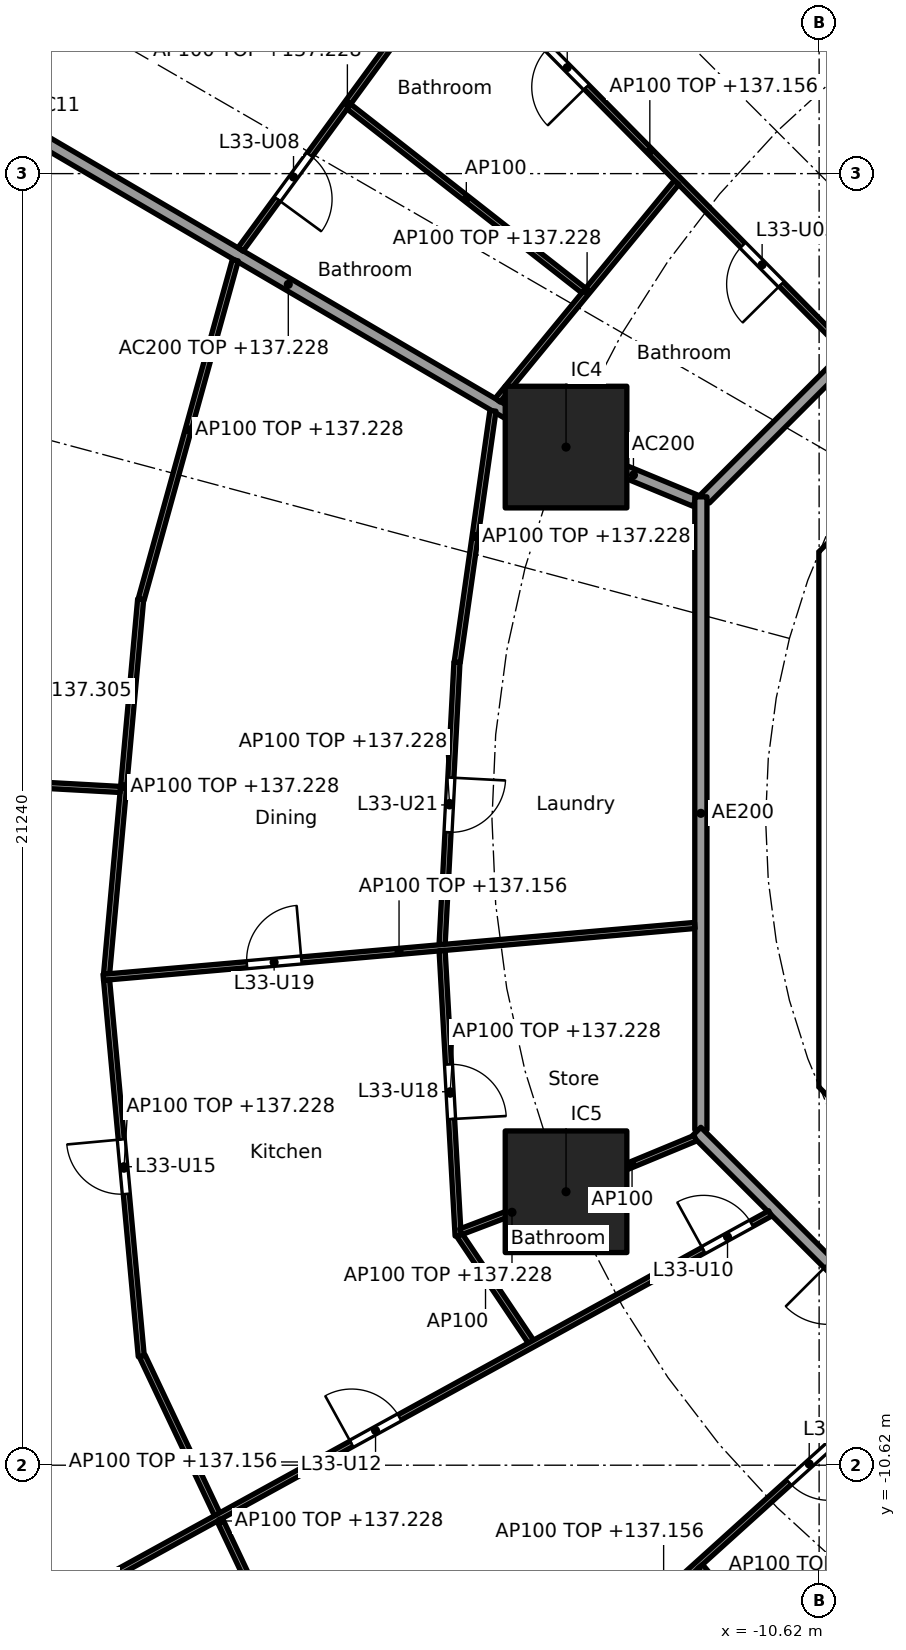
"""IFC4 building model, lengths in metres.
Left out: names, types, materials, properties, quantities, classifications, styles, units other than length and angle.
Written with IfcOpenShell. Run it as: python <this file> out.ifc"""

import sys

from ifc_helpers import new_model, si_unit, direction, frame, frame_2d, origin, origin_2d, place, context, subcontext, project, spatial, polyline, rectangle, outline, extrude, element, fill, save


model = new_model("IFC4")
c1 = context("Model", 3, precision=1e-05, world=origin(), true_north=direction((0.0, 1.0)))
c2 = subcontext(c1, "Body", "Model", "MODEL_VIEW")
j1 = project(units=[si_unit("LENGTHUNIT", "METRE"), si_unit("PLANEANGLEUNIT", "RADIAN")], contexts=[c1])
p1 = place(None, origin())
s1 = spatial("IfcSite", under=j1, at=p1, CompositionType="ELEMENT")
p2 = place(p1, origin())
s2 = spatial("IfcBuilding", under=s1, at=p2, CompositionType="ELEMENT")
p3 = place(p2, frame((0.0, 0.0, 134.4)))
s3 = spatial("IfcBuildingStorey", under=s2, at=p3, CompositionType="ELEMENT", Elevation=134.4)
for number, where, z_axis, x_axis in (
    (1, (-14.782, 6.123, 0.0), (0.0, 0.0, 1.0), (1.0, 0.0, 0.0)),
    (2, (-14.782, -6.123, 0.0), (0.0, 0.0, 1.0), (1.0, 0.0, 0.0)),
):
    element("IfcColumn", number, at=place(p3, frame(where, z_axis=z_axis, x_axis=x_axis)), inside=s3, PredefinedType="COLUMN", context=c2, shape_type="SweptSolid", body=[
        extrude(rectangle(XDim=2.0, YDim=2.0, at=origin_2d()), origin(), (0.0, 0.0, 1.0), 3.7),
    ])
p4 = place(p3, frame((-10.325, 3.801, 0.0), z_axis=(0.0, 0.0, 1.0), x_axis=(0.0, -1.0, 0.0)))
e3 = element("IfcWall", 3, at=p4, inside=s3, PredefinedType="SHEAR", context=c2, shape_type="SweptSolid", body=[
    extrude(rectangle(XDim=7.602, YDim=0.6, at=frame_2d((3.801, 0.0))), origin(), (0.0, 0.0, 1.0), 3.44),
])
p5 = place(p4, frame((0.651, 0.0, 0.0)))
e4 = element("IfcOpeningElement", 4, at=p5, cuts=e3, PredefinedType="OPENING", context=c2, shape_type="SweptSolid", body=[
    extrude(rectangle(XDim=1.5, YDim=2.1, at=frame_2d((0.75, 1.05))), frame((0.0, 0.31, 0.0), z_axis=(0.0, -1.0, 0.0), x_axis=(1.0, 0.0, 0.0)), (0.0, 0.0, 1.0), 0.62),
])
p6 = place(p4, frame((5.451, 0.0, 0.0)))
e5 = element("IfcOpeningElement", 5, at=p6, cuts=e3, PredefinedType="OPENING", context=c2, shape_type="SweptSolid", body=[
    extrude(rectangle(XDim=1.5, YDim=2.1, at=frame_2d((0.75, 1.05))), frame((0.0, 0.31, 0.0), z_axis=(0.0, -1.0, 0.0), x_axis=(1.0, 0.0, 0.0)), (0.0, 0.0, 1.0), 0.62),
])
p7 = place(p3, origin())
e6 = element("IfcWall", 6, at=p7, inside=s3, PredefinedType="SHEAR", context=c2, shape_type="SweptSolid", body=[
    extrude(outline(polyline([(-10.625, -3.801), (-10.025, -3.801), (-10.025, -4.152), (-9.776, -4.401), (-10.2, -4.825), (-10.625, -4.401), (-10.625, -3.801)])), origin(), (0.0, 0.0, 1.0), 3.44),
])
p8 = place(p3, origin())
e7 = element("IfcWall", 7, at=p8, inside=s3, PredefinedType="SHEAR", context=c2, shape_type="SweptSolid", body=[
    extrude(outline(polyline([(-10.2, 4.825), (-9.776, 4.401), (-10.025, 4.152), (-10.025, 3.801), (-10.625, 3.801), (-10.625, 4.401), (-10.2, 4.825)])), origin(), (0.0, 0.0, 1.0), 3.44),
])
p9 = place(p3, frame((-12.657, 5.243, 0.0), z_axis=(0.0, 0.0, 1.0), x_axis=(-0.923869415315, 0.382707856524, 0.0)))
e8 = element("IfcWall", 8, at=p9, inside=s3, PredefinedType="PARTITIONING", context=c2, shape_type="SweptSolid", body=[
    extrude(rectangle(XDim=2.2, YDim=0.2, at=frame_2d((1.1, 0.0))), origin(), (0.0, 0.0, 1.0), 3.44),
])
p10 = place(p3, frame((-14.825, 6.148, 0.0), z_axis=(0.0, 0.0, 1.0), x_axis=(-0.862852031662, 0.505456597006, 0.0)))
e9 = element("IfcWall", 9, at=p10, inside=s3, PredefinedType="PARTITIONING", context=c2, shape_type="SweptSolid", body=[
    extrude(rectangle(XDim=10.487, YDim=0.2, at=frame_2d((5.244, 0.0))), origin(), (0.0, 0.0, 1.0), 2.828),
])
p11 = place(p3, frame((-5.275, 12.494, 0.0), z_axis=(0.0, 0.0, 1.0), x_axis=(-0.707106781187, -0.707106781187, 0.0)))
e10 = element("IfcWall", 10, at=p11, inside=s3, PredefinedType="PARTITIONING", context=c2, shape_type="SweptSolid", body=[
    extrude(rectangle(XDim=10.209, YDim=0.2, at=frame_2d((5.104, 0.0))), origin(), (0.0, 0.0, 1.0), 3.44),
])
p12 = place(p11, frame((4.604, 0.0, 0.0)))
e11 = element("IfcOpeningElement", 11, at=p12, cuts=e10, PredefinedType="OPENING", context=c2, shape_type="SweptSolid", body=[
    extrude(rectangle(XDim=1.0, YDim=2.1, at=frame_2d((0.5, 1.05))), frame((0.0, 0.11, 0.0), z_axis=(0.0, -1.0, 0.0), x_axis=(1.0, 0.0, 0.0)), (0.0, 0.0, 1.0), 0.22),
])
p13 = place(p3, frame((-12.565, 5.304, 0.0), z_axis=(0.0, 0.0, 1.0), x_axis=(0.0, -1.0, 0.0)))
e12 = element("IfcWall", 12, at=p13, inside=s3, PredefinedType="PARTITIONING", context=c2, shape_type="SweptSolid", body=[
    extrude(rectangle(XDim=10.409, YDim=0.2, at=frame_2d((5.205, 0.0))), origin(), (0.0, 0.0, 1.0), 3.44),
])
p14 = place(p3, frame((-12.635, -5.134, 0.0), z_axis=(0.0, 0.0, 1.0), x_axis=(0.707106781187, -0.707106781187, 0.0)))
e13 = element("IfcWall", 13, at=p14, inside=s3, PredefinedType="PARTITIONING", context=c2, shape_type="SweptSolid", body=[
    extrude(rectangle(XDim=10.609, YDim=0.2, at=frame_2d((5.305, 0.0))), origin(), (0.0, 0.0, 1.0), 3.44),
])
p15 = place(p14, frame((3.07, 0.0, 0.0)))
e14 = element("IfcOpeningElement", 14, at=p15, cuts=e13, PredefinedType="OPENING", context=c2, shape_type="SweptSolid", body=[
    extrude(rectangle(XDim=1.0, YDim=2.1, at=frame_2d((0.5, 1.05))), frame((0.0, 0.11, 0.0), z_axis=(0.0, -1.0, 0.0), x_axis=(1.0, 0.0, 0.0)), (0.0, 0.0, 1.0), 0.22),
])
p16 = place(p3, frame((-7.708, 10.198, 0.0), z_axis=(0.0, 0.0, 1.0), x_axis=(-0.497449462689, 0.867492957937, 0.0)))
e15 = element("IfcWall", 15, at=p16, inside=s3, PredefinedType="PARTITIONING", context=c2, shape_type="SweptSolid", body=[
    extrude(rectangle(XDim=9.185, YDim=0.1, at=frame_2d((4.592, 0.0))), origin(), (0.0, 0.0, 1.0), 2.756),
])
p17 = place(p16, frame((1.511, 0.0, 0.0)))
e16 = element("IfcOpeningElement", 16, at=p17, cuts=e15, PredefinedType="OPENING", context=c2, shape_type="SweptSolid", body=[
    extrude(rectangle(XDim=0.9, YDim=2.1, at=frame_2d((0.45, 1.05))), frame((0.0, 0.06, 0.0), z_axis=(0.0, -1.0, 0.0), x_axis=(1.0, 0.0, 0.0)), (0.0, 0.0, 1.0), 0.12),
])
p18 = place(p16, frame((6.078, 0.0, 0.0)))
e17 = element("IfcOpeningElement", 17, at=p18, cuts=e15, PredefinedType="OPENING", context=c2, shape_type="SweptSolid", body=[
    extrude(rectangle(XDim=0.9, YDim=2.1, at=frame_2d((0.45, 1.05))), frame((0.0, 0.06, 0.0), z_axis=(0.0, -1.0, 0.0), x_axis=(1.0, 0.0, 0.0)), (0.0, 0.0, 1.0), 0.12),
])
p19 = place(p3, frame((-10.182, 7.729, 0.0), z_axis=(0.0, 0.0, 1.0), x_axis=(-0.702927211734, 0.711261790766, 0.0)))
e18 = element("IfcWall", 18, at=p19, inside=s3, PredefinedType="PARTITIONING", context=c2, shape_type="SweptSolid", body=[
    extrude(rectangle(XDim=9.168, YDim=0.1, at=frame_2d((4.584, 0.0))), origin(), (0.0, 0.0, 1.0), 2.756),
])
p20 = place(p19, frame((1.507, 0.0, 0.0)))
e19 = element("IfcOpeningElement", 19, at=p20, cuts=e18, PredefinedType="OPENING", context=c2, shape_type="SweptSolid", body=[
    extrude(rectangle(XDim=0.9, YDim=2.1, at=frame_2d((0.45, 1.05))), frame((0.0, 0.06, 0.0), z_axis=(0.0, -1.0, 0.0), x_axis=(1.0, 0.0, 0.0)), (0.0, 0.0, 1.0), 0.12),
])
p21 = place(p19, frame((6.067, 0.0, 0.0)))
e20 = element("IfcOpeningElement", 20, at=p21, cuts=e18, PredefinedType="OPENING", context=c2, shape_type="SweptSolid", body=[
    extrude(rectangle(XDim=0.9, YDim=2.1, at=frame_2d((0.45, 1.05))), frame((0.0, 0.06, 0.0), z_axis=(0.0, -1.0, 0.0), x_axis=(1.0, 0.0, 0.0)), (0.0, 0.0, 1.0), 0.12),
])
p22 = place(p3, frame((-12.965, 10.475, 0.0), z_axis=(0.0, 0.0, 1.0), x_axis=(-0.634943961338, -0.772558195841, 0.0)))
e21 = element("IfcWall", 21, at=p22, inside=s3, PredefinedType="PARTITIONING", context=c2, shape_type="SweptSolid", body=[
    extrude(rectangle(XDim=4.632, YDim=0.1, at=frame_2d((2.316, 0.0))), origin(), (0.0, 0.0, 1.0), 2.828),
])
p23 = place(p3, frame((-16.621, 14.174, 0.0), z_axis=(0.0, 0.0, 1.0), x_axis=(-0.590674917338, -0.806909624449, 0.0)))
e22 = element("IfcWall", 22, at=p23, inside=s3, PredefinedType="PARTITIONING", context=c2, shape_type="SweptSolid", body=[
    extrude(rectangle(XDim=5.949, YDim=0.1, at=frame_2d((2.975, 0.0))), origin(), (0.0, 0.0, 1.0), 2.828),
])
p24 = place(p23, frame((4.024, 0.0, 0.0)))
e23 = element("IfcOpeningElement", 23, at=p24, cuts=e22, PredefinedType="OPENING", context=c2, shape_type="SweptSolid", body=[
    extrude(rectangle(XDim=0.9, YDim=2.1, at=frame_2d((0.45, 1.05))), frame((0.0, 0.06, 0.0), z_axis=(0.0, -1.0, 0.0), x_axis=(1.0, 0.0, 0.0)), (0.0, 0.0, 1.0), 0.12),
])
p25 = place(p3, frame((-14.491, 8.697, 0.0), z_axis=(0.0, 0.0, 1.0), x_axis=(-0.787139479951, 0.616775031193, 0.0)))
e24 = element("IfcWall", 24, at=p25, inside=s3, PredefinedType="PARTITIONING", context=c2, shape_type="SweptSolid", body=[
    extrude(rectangle(XDim=4.907, YDim=0.1, at=frame_2d((2.453, 0.0))), origin(), (0.0, 0.0, 1.0), 3.44),
])
p26 = place(p3, frame((-15.984, 6.72, 0.0), z_axis=(0.0, 0.0, 1.0), x_axis=(-0.140684869512, -0.990054426529, 0.0)))
e25 = element("IfcWall", 25, at=p26, inside=s3, PredefinedType="PARTITIONING", context=c2, shape_type="SweptSolid", body=[
    extrude(rectangle(XDim=4.177, YDim=0.1, at=frame_2d((2.088, 0.0))), origin(), (0.0, 0.0, 1.0), 2.828),
])
p27 = place(p3, frame((-20.221, 9.197, 0.0), z_axis=(0.0, 0.0, 1.0), x_axis=(-0.267398009191, -0.963586168789, 0.0)))
e26 = element("IfcWall", 26, at=p27, inside=s3, PredefinedType="PARTITIONING", context=c2, shape_type="SweptSolid", body=[
    extrude(rectangle(XDim=5.788, YDim=0.1, at=frame_2d((2.894, 0.0))), origin(), (0.0, 0.0, 1.0), 2.828),
])
p28 = place(p3, frame((-16.576, 2.585, 0.0), z_axis=(0.0, 0.0, 1.0), x_axis=(-0.052509224895, -0.998620439056, 0.0)))
e27 = element("IfcWall", 27, at=p28, inside=s3, PredefinedType="PARTITIONING", context=c2, shape_type="SweptSolid", body=[
    extrude(rectangle(XDim=4.649, YDim=0.1, at=frame_2d((2.325, 0.0))), origin(), (0.0, 0.0, 1.0), 2.828),
])
p29 = place(p28, frame((1.9, 0.0, 0.0)))
e28 = element("IfcOpeningElement", 28, at=p29, cuts=e27, PredefinedType="OPENING", context=c2, shape_type="SweptSolid", body=[
    extrude(rectangle(XDim=0.9, YDim=2.1, at=frame_2d((0.45, 1.05))), frame((0.0, 0.06, 0.0), z_axis=(0.0, -1.0, 0.0), x_axis=(1.0, 0.0, 0.0)), (0.0, 0.0, 1.0), 0.12),
])
p30 = place(p3, frame((-21.777, 3.621, 0.0), z_axis=(0.0, 0.0, 1.0), x_axis=(-0.090606877484, -0.995886737412, 0.0)))
e29 = element("IfcWall", 29, at=p30, inside=s3, PredefinedType="PARTITIONING", context=c2, shape_type="SweptSolid", body=[
    extrude(rectangle(XDim=6.189, YDim=0.1, at=frame_2d((3.095, 0.0))), origin(), (0.0, 0.0, 1.0), 2.828),
])
p31 = place(p3, frame((-22.112, 0.492, 0.0), z_axis=(0.0, 0.0, 1.0), x_axis=(-0.998479185151, 0.055129999278, 0.0)))
e30 = element("IfcWall", 30, at=p31, inside=s3, PredefinedType="PARTITIONING", context=c2, shape_type="SweptSolid", body=[
    extrude(rectangle(XDim=5.965, YDim=0.1, at=frame_2d((2.982, 0.0))), origin(), (0.0, 0.0, 1.0), 2.905),
])
p32 = place(p31, frame((2.533, 0.0, 0.0)))
e31 = element("IfcOpeningElement", 31, at=p32, cuts=e30, PredefinedType="OPENING", context=c2, shape_type="SweptSolid", body=[
    extrude(rectangle(XDim=0.9, YDim=2.1, at=frame_2d((0.45, 1.05))), frame((0.0, 0.06, 0.0), z_axis=(0.0, -1.0, 0.0), x_axis=(1.0, 0.0, 0.0)), (0.0, 0.0, 1.0), 0.12),
])
p33 = place(p3, frame((-12.664, -1.744, 0.0), z_axis=(0.0, 0.0, 1.0), x_axis=(-0.99617728169, -0.087354584571, 0.0)))
e32 = element("IfcWall", 32, at=p33, inside=s3, PredefinedType="PARTITIONING", context=c2, shape_type="SweptSolid", body=[
    extrude(rectangle(XDim=9.765, YDim=0.1, at=frame_2d((4.883, 0.0))), origin(), (0.0, 0.0, 1.0), 2.756),
])
p34 = place(p33, frame((6.495, 0.0, 0.0)))
e33 = element("IfcOpeningElement", 33, at=p34, cuts=e32, PredefinedType="OPENING", context=c2, shape_type="SweptSolid", body=[
    extrude(rectangle(XDim=0.9, YDim=2.1, at=frame_2d((0.45, 1.05))), frame((0.0, 0.06, 0.0), z_axis=(0.0, -1.0, 0.0), x_axis=(1.0, 0.0, 0.0)), (0.0, 0.0, 1.0), 0.12),
])
p35 = place(p3, frame((-16.82, -2.158, 0.0), z_axis=(0.0, 0.0, 1.0), x_axis=(0.055967931845, -0.998432566879, 0.0)))
e34 = element("IfcWall", 34, at=p35, inside=s3, PredefinedType="PARTITIONING", context=c2, shape_type="SweptSolid", body=[
    extrude(rectangle(XDim=4.698, YDim=0.1, at=frame_2d((2.349, 0.0))), origin(), (0.0, 0.0, 1.0), 2.828),
])
p36 = place(p35, frame((1.874, 0.0, 0.0)))
e35 = element("IfcOpeningElement", 35, at=p36, cuts=e34, PredefinedType="OPENING", context=c2, shape_type="SweptSolid", body=[
    extrude(rectangle(XDim=0.9, YDim=2.1, at=frame_2d((0.45, 1.05))), frame((0.0, 0.06, 0.0), z_axis=(0.0, -1.0, 0.0), x_axis=(1.0, 0.0, 0.0)), (0.0, 0.0, 1.0), 0.12),
])
p37 = place(p3, frame((-22.338, -2.642, 0.0), z_axis=(0.0, 0.0, 1.0), x_axis=(0.091768304523, -0.995780386574, 0.0)))
e36 = element("IfcWall", 36, at=p37, inside=s3, PredefinedType="PARTITIONING", context=c2, shape_type="SweptSolid", body=[
    extrude(rectangle(XDim=6.215, YDim=0.1, at=frame_2d((3.107, 0.0))), origin(), (0.0, 0.0, 1.0), 2.828),
])
p38 = place(p37, frame((2.632, 0.0, 0.0)))
e37 = element("IfcOpeningElement", 37, at=p38, cuts=e36, PredefinedType="OPENING", context=c2, shape_type="SweptSolid", body=[
    extrude(rectangle(XDim=0.9, YDim=2.1, at=frame_2d((0.45, 1.05))), frame((0.0, 0.06, 0.0), z_axis=(0.0, -1.0, 0.0), x_axis=(1.0, 0.0, 0.0)), (0.0, 0.0, 1.0), 0.12),
])
p39 = place(p3, frame((-12.657, -5.243, 0.0), z_axis=(0.0, 0.0, 1.0), x_axis=(-0.923864733477, -0.382719158442, 0.0)))
e38 = element("IfcWall", 38, at=p39, inside=s3, PredefinedType="PARTITIONING", context=c2, shape_type="SweptSolid", body=[
    extrude(rectangle(XDim=2.25, YDim=0.1, at=frame_2d((1.125, 0.0))), origin(), (0.0, 0.0, 1.0), 3.44),
])
p40 = place(p3, frame((-14.829, -6.141, 0.0), z_axis=(0.0, 0.0, 1.0), x_axis=(-0.934704367514, -0.355426146128, 0.0)))
e39 = element("IfcWall", 39, at=p40, inside=s3, PredefinedType="PARTITIONING", context=c2, shape_type="SweptSolid", body=[
    extrude(rectangle(XDim=1.802, YDim=0.1, at=frame_2d((0.901, 0.0))), origin(), (0.0, 0.0, 1.0), 2.828),
])
p41 = place(p3, frame((-16.532, -6.84, 0.0), z_axis=(0.0, 0.0, 1.0), x_axis=(0.556994773624, -0.830515997531, 0.0)))
e40 = element("IfcWall", 40, at=p41, inside=s3, PredefinedType="PARTITIONING", context=c2, shape_type="SweptSolid", body=[
    extrude(rectangle(XDim=2.183, YDim=0.1, at=frame_2d((1.092, 0.0))), origin(), (0.0, 0.0, 1.0), 3.44),
])
p42 = place(p3, frame((-21.75, -8.826, 0.0), z_axis=(0.0, 0.0, 1.0), x_axis=(0.427736419988, -0.903903509793, 0.0)))
e41 = element("IfcWall", 41, at=p42, inside=s3, PredefinedType="PARTITIONING", context=c2, shape_type="SweptSolid", body=[
    extrude(rectangle(XDim=5.999, YDim=0.1, at=frame_2d((3.0, 0.0))), origin(), (0.0, 0.0, 1.0), 2.828),
])
p43 = place(p3, frame((-11.426, -6.479, 0.0), z_axis=(0.0, 0.0, 1.0), x_axis=(-0.876110392495, -0.482110547657, 0.0)))
e42 = element("IfcWall", 42, at=p43, inside=s3, PredefinedType="PARTITIONING", context=c2, shape_type="SweptSolid", body=[
    extrude(rectangle(XDim=16.955, YDim=0.1, at=frame_2d((8.478, 0.0))), origin(), (0.0, 0.0, 1.0), 2.756),
])
p44 = place(p43, frame((0.35, 0.0, 0.0)))
e43 = element("IfcOpeningElement", 43, at=p44, cuts=e42, PredefinedType="OPENING", context=c2, shape_type="SweptSolid", body=[
    extrude(rectangle(XDim=0.9, YDim=2.1, at=frame_2d((0.45, 1.05))), frame((0.0, 0.06, 0.0), z_axis=(0.0, -1.0, 0.0), x_axis=(1.0, 0.0, 0.0)), (0.0, 0.0, 1.0), 0.12),
])
p45 = place(p43, frame((6.957, 0.0, 0.0)))
e44 = element("IfcOpeningElement", 44, at=p45, cuts=e42, PredefinedType="OPENING", context=c2, shape_type="SweptSolid", body=[
    extrude(rectangle(XDim=0.9, YDim=2.1, at=frame_2d((0.45, 1.05))), frame((0.0, 0.06, 0.0), z_axis=(0.0, -1.0, 0.0), x_axis=(1.0, 0.0, 0.0)), (0.0, 0.0, 1.0), 0.12),
])
p46 = place(p43, frame((13.206, 0.0, 0.0)))
e45 = element("IfcOpeningElement", 45, at=p46, cuts=e42, PredefinedType="OPENING", context=c2, shape_type="SweptSolid", body=[
    extrude(rectangle(XDim=0.9, YDim=2.1, at=frame_2d((0.45, 1.05))), frame((0.0, 0.06, 0.0), z_axis=(0.0, -1.0, 0.0), x_axis=(1.0, 0.0, 0.0)), (0.0, 0.0, 1.0), 0.12),
])
p47 = place(p3, frame((-8.959, -8.952, 0.0), z_axis=(0.0, 0.0, 1.0), x_axis=(-0.741982736283, -0.670418987692, 0.0)))
e46 = element("IfcWall", 46, at=p47, inside=s3, PredefinedType="PARTITIONING", context=c2, shape_type="SweptSolid", body=[
    extrude(rectangle(XDim=11.371, YDim=0.1, at=frame_2d((5.685, 0.0))), origin(), (0.0, 0.0, 1.0), 2.756),
])
p48 = place(p47, frame((2.009, 0.0, 0.0)))
e47 = element("IfcOpeningElement", 47, at=p48, cuts=e46, PredefinedType="OPENING", context=c2, shape_type="SweptSolid", body=[
    extrude(rectangle(XDim=0.9, YDim=2.1, at=frame_2d((0.45, 1.05))), frame((0.0, 0.06, 0.0), z_axis=(0.0, -1.0, 0.0), x_axis=(1.0, 0.0, 0.0)), (0.0, 0.0, 1.0), 0.12),
])
p49 = place(p47, frame((7.694, 0.0, 0.0)))
e48 = element("IfcOpeningElement", 48, at=p49, cuts=e46, PredefinedType="OPENING", context=c2, shape_type="SweptSolid", body=[
    extrude(rectangle(XDim=0.9, YDim=2.1, at=frame_2d((0.45, 1.05))), frame((0.0, 0.06, 0.0), z_axis=(0.0, -1.0, 0.0), x_axis=(1.0, 0.0, 0.0)), (0.0, 0.0, 1.0), 0.12),
])
p50 = place(p3, frame((-12.575, -12.286, 0.0), z_axis=(0.0, 0.0, 1.0), x_axis=(0.644052758448, -0.764981074495, 0.0)))
e49 = element("IfcWall", 49, at=p50, inside=s3, PredefinedType="PARTITIONING", context=c2, shape_type="SweptSolid", body=[
    extrude(rectangle(XDim=2.174, YDim=0.1, at=frame_2d((1.087, 0.0))), origin(), (0.0, 0.0, 1.0), 2.828),
])
p51 = place(p20, origin())
e50 = element("IfcDoor", 50, at=p51, inside=s3, OperationType="SINGLE_SWING_LEFT", PredefinedType="DOOR", context=c2, shape_type="SweptSolid", body=[
    extrude(rectangle(XDim=0.9, YDim=2.1, at=frame_2d((0.45, 1.05))), frame((0.0, 0.025, 0.0), z_axis=(0.0, -1.0, 0.0), x_axis=(1.0, 0.0, 0.0)), (0.0, 0.0, 1.0), 0.05),
])
fill(e19, e50)
p52 = place(p21, origin())
e51 = element("IfcDoor", 51, at=p52, inside=s3, OperationType="SINGLE_SWING_LEFT", PredefinedType="DOOR", context=c2, shape_type="SweptSolid", body=[
    extrude(rectangle(XDim=0.9, YDim=2.1, at=frame_2d((0.45, 1.05))), frame((0.0, 0.025, 0.0), z_axis=(0.0, -1.0, 0.0), x_axis=(1.0, 0.0, 0.0)), (0.0, 0.0, 1.0), 0.05),
])
fill(e20, e51)
p53 = place(p24, origin())
e52 = element("IfcDoor", 52, at=p53, inside=s3, OperationType="SINGLE_SWING_RIGHT", PredefinedType="DOOR", context=c2, shape_type="SweptSolid", body=[
    extrude(rectangle(XDim=0.9, YDim=2.1, at=frame_2d((0.45, 1.05))), frame((0.0, 0.025, 0.0), z_axis=(0.0, -1.0, 0.0), x_axis=(1.0, 0.0, 0.0)), (0.0, 0.0, 1.0), 0.05),
])
fill(e23, e52)
p54 = place(p44, frame((0.9, 0.0, 0.0), x_axis=(-1.0, 0.0, 0.0)))
e53 = element("IfcDoor", 53, at=p54, inside=s3, OperationType="SINGLE_SWING_LEFT", PredefinedType="DOOR", context=c2, shape_type="SweptSolid", body=[
    extrude(rectangle(XDim=0.9, YDim=2.1, at=frame_2d((0.45, 1.05))), frame((0.0, 0.025, 0.0), z_axis=(0.0, -1.0, 0.0), x_axis=(1.0, 0.0, 0.0)), (0.0, 0.0, 1.0), 0.05),
])
fill(e43, e53)
p55 = place(p48, origin())
e54 = element("IfcDoor", 54, at=p55, inside=s3, OperationType="SINGLE_SWING_LEFT", PredefinedType="DOOR", context=c2, shape_type="SweptSolid", body=[
    extrude(rectangle(XDim=0.9, YDim=2.1, at=frame_2d((0.45, 1.05))), frame((0.0, 0.025, 0.0), z_axis=(0.0, -1.0, 0.0), x_axis=(1.0, 0.0, 0.0)), (0.0, 0.0, 1.0), 0.05),
])
fill(e47, e54)
p56 = place(p45, frame((0.9, 0.0, 0.0), x_axis=(-1.0, 0.0, 0.0)))
e55 = element("IfcDoor", 55, at=p56, inside=s3, OperationType="SINGLE_SWING_LEFT", PredefinedType="DOOR", context=c2, shape_type="SweptSolid", body=[
    extrude(rectangle(XDim=0.9, YDim=2.1, at=frame_2d((0.45, 1.05))), frame((0.0, 0.025, 0.0), z_axis=(0.0, -1.0, 0.0), x_axis=(1.0, 0.0, 0.0)), (0.0, 0.0, 1.0), 0.05),
])
fill(e44, e55)
p57 = place(p38, frame((0.9, 0.0, 0.0), x_axis=(-1.0, 0.0, 0.0)))
e56 = element("IfcDoor", 56, at=p57, inside=s3, OperationType="SINGLE_SWING_RIGHT", PredefinedType="DOOR", context=c2, shape_type="SweptSolid", body=[
    extrude(rectangle(XDim=0.9, YDim=2.1, at=frame_2d((0.45, 1.05))), frame((0.0, 0.025, 0.0), z_axis=(0.0, -1.0, 0.0), x_axis=(1.0, 0.0, 0.0)), (0.0, 0.0, 1.0), 0.05),
])
fill(e37, e56)
p58 = place(p36, origin())
e57 = element("IfcDoor", 57, at=p58, inside=s3, OperationType="SINGLE_SWING_RIGHT", PredefinedType="DOOR", context=c2, shape_type="SweptSolid", body=[
    extrude(rectangle(XDim=0.9, YDim=2.1, at=frame_2d((0.45, 1.05))), frame((0.0, 0.025, 0.0), z_axis=(0.0, -1.0, 0.0), x_axis=(1.0, 0.0, 0.0)), (0.0, 0.0, 1.0), 0.05),
])
fill(e35, e57)
p59 = place(p34, frame((0.9, 0.0, 0.0), x_axis=(-1.0, 0.0, 0.0)))
e58 = element("IfcDoor", 58, at=p59, inside=s3, OperationType="SINGLE_SWING_RIGHT", PredefinedType="DOOR", context=c2, shape_type="SweptSolid", body=[
    extrude(rectangle(XDim=0.9, YDim=2.1, at=frame_2d((0.45, 1.05))), frame((0.0, 0.025, 0.0), z_axis=(0.0, -1.0, 0.0), x_axis=(1.0, 0.0, 0.0)), (0.0, 0.0, 1.0), 0.05),
])
fill(e33, e58)
p60 = place(p29, origin())
e59 = element("IfcDoor", 59, at=p60, inside=s3, OperationType="SINGLE_SWING_LEFT", PredefinedType="DOOR", context=c2, shape_type="SweptSolid", body=[
    extrude(rectangle(XDim=0.9, YDim=2.1, at=frame_2d((0.45, 1.05))), frame((0.0, 0.025, 0.0), z_axis=(0.0, -1.0, 0.0), x_axis=(1.0, 0.0, 0.0)), (0.0, 0.0, 1.0), 0.05),
])
fill(e28, e59)
save(model, sys.argv[1])
